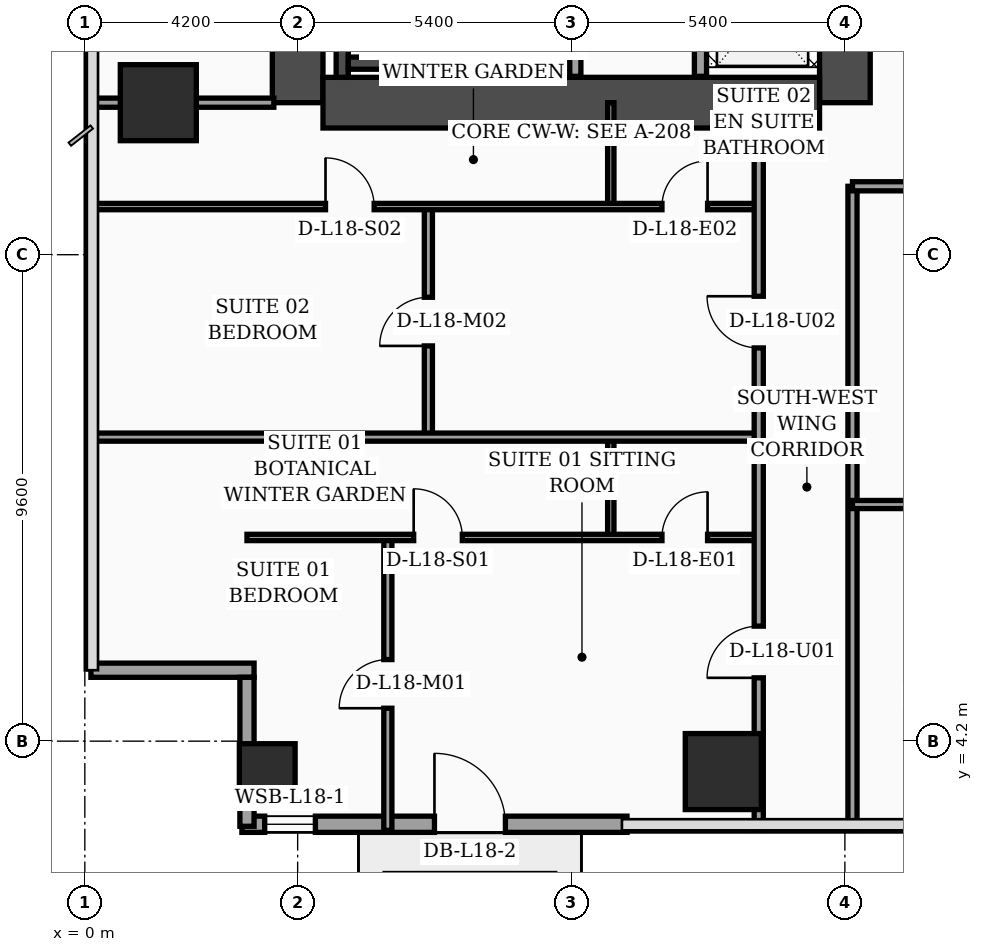
"""IFC4 building model, lengths in metres.
Left out: names, types, materials, properties, quantities, classifications, styles, units other than length and angle.
Written with IfcOpenShell. Run it as: python <this file> out.ifc"""

import sys

from ifc_helpers import new_model, si_unit, direction, frame, frame_2d, origin, origin_2d, place, context, subcontext, project, spatial, rectangle, hollow_rectangle, extrude, element, fill, save


model = new_model("IFC4")
c1 = context("Model", 3, precision=1e-05, world=origin(), true_north=direction((0.0, 1.0)))
c2 = subcontext(c1, "Body", "Model", "MODEL_VIEW")
j1 = project(units=[si_unit("LENGTHUNIT", "METRE"), si_unit("PLANEANGLEUNIT", "RADIAN")], contexts=[c1])
p1 = place(None, origin())
s1 = spatial("IfcSite", under=j1, at=p1, CompositionType="ELEMENT")
p2 = place(p1, origin())
s2 = spatial("IfcBuilding", under=s1, at=p2, CompositionType="ELEMENT")
p3 = place(p2, frame((0.0, 0.0, 77.4)))
s3 = spatial("IfcBuildingStorey", under=s2, at=p3, CompositionType="ELEMENT", Elevation=77.4)
p4 = place(p3, frame((4.2, 16.8, 0.0), z_axis=(0.0, 0.0, 1.0), x_axis=(0.0, 1.0, 0.0)))
e1 = element("IfcWall", 1, at=p4, inside=s3, PredefinedType="SHEAR", context=c2, shape_type="SweptSolid", body=[
    extrude(rectangle(XDim=21.6, YDim=1.0, at=frame_2d((10.8, 0.0))), origin(), (0.0, 0.0, 1.0), 3.56),
])
p5 = place(p3, frame((15.0, 16.8, 0.0), z_axis=(0.0, 0.0, 1.0), x_axis=(0.0, 1.0, 0.0)))
e2 = element("IfcWall", 2, at=p5, inside=s3, PredefinedType="SHEAR", context=c2, shape_type="SweptSolid", body=[
    extrude(rectangle(XDim=21.6, YDim=1.0, at=frame_2d((10.8, 0.0))), origin(), (0.0, 0.0, 1.0), 3.56),
])
p6 = place(p5, frame((8.65, 0.0, 0.0)))
e3 = element("IfcOpeningElement", 3, at=p6, cuts=e2, PredefinedType="OPENING", context=c2, shape_type="SweptSolid", body=[
    extrude(rectangle(XDim=1.1, YDim=2.2, at=frame_2d((0.55, 1.1))), frame((0.0, 0.51, 0.0), z_axis=(0.0, -1.0, 0.0), x_axis=(1.0, 0.0, 0.0)), (0.0, 0.0, 1.0), 1.02),
])
p7 = place(p5, frame((1.25, 0.0, 0.0)))
e4 = element("IfcOpeningElement", 4, at=p7, cuts=e2, PredefinedType="OPENING", context=c2, shape_type="SweptSolid", body=[
    extrude(rectangle(XDim=1.1, YDim=2.2, at=frame_2d((0.55, 1.1))), frame((0.0, 0.51, 0.0), z_axis=(0.0, -1.0, 0.0), x_axis=(1.0, 0.0, 0.0)), (0.0, 0.0, 1.0), 1.02),
])
p8 = place(p5, frame((3.8, 0.0, 0.0)))
e5 = element("IfcOpeningElement", 5, at=p8, cuts=e2, PredefinedType="OPENING", context=c2, shape_type="SweptSolid", body=[
    extrude(rectangle(XDim=1.1, YDim=2.2, at=frame_2d((0.55, 1.1))), frame((0.0, 0.51, 0.0), z_axis=(0.0, -1.0, 0.0), x_axis=(1.0, 0.0, 0.0)), (0.0, 0.0, 1.0), 1.02),
])
p9 = place(p5, frame((6.35, 0.0, 0.0)))
e6 = element("IfcOpeningElement", 6, at=p9, cuts=e2, PredefinedType="OPENING", context=c2, shape_type="SweptSolid", body=[
    extrude(rectangle(XDim=1.1, YDim=2.2, at=frame_2d((0.55, 1.1))), frame((0.0, 0.51, 0.0), z_axis=(0.0, -1.0, 0.0), x_axis=(1.0, 0.0, 0.0)), (0.0, 0.0, 1.0), 1.02),
])
p10 = place(p3, frame((4.7, 16.8, 0.0), z_axis=(0.0, 0.0, 1.0), x_axis=(1.0, 0.0, 0.0)))
e7 = element("IfcWall", 7, at=p10, inside=s3, PredefinedType="SHEAR", context=c2, shape_type="SweptSolid", body=[
    extrude(rectangle(XDim=9.8, YDim=1.0, at=frame_2d((4.9, 0.0))), origin(), (0.0, 0.0, 1.0), 3.56),
])
p11 = place(p3, frame((5.08, 17.3, 0.0), z_axis=(0.0, 0.0, 1.0), x_axis=(0.0, 1.0, 0.0)))
e8 = element("IfcWall", 8, at=p11, inside=s3, PredefinedType="SOLIDWALL", context=c2, shape_type="SweptSolid", body=[
    extrude(rectangle(XDim=9.49, YDim=0.24, at=frame_2d((4.745, 0.0))), origin(), (0.0, 0.0, 1.0), 3.56),
])
p12 = place(p3, frame((8.42, 17.3, 0.0), z_axis=(0.0, 0.0, 1.0), x_axis=(0.0, 1.0, 0.0)))
e9 = element("IfcWall", 9, at=p12, inside=s3, PredefinedType="SOLIDWALL", context=c2, shape_type="SweptSolid", body=[
    extrude(rectangle(XDim=9.49, YDim=0.24, at=frame_2d((4.745, 0.0))), origin(), (0.0, 0.0, 1.0), 3.56),
])
p13 = place(p12, frame((0.35, 0.0, 0.0)))
e10 = element("IfcOpeningElement", 10, at=p13, cuts=e9, PredefinedType="OPENING", context=c2, shape_type="SweptSolid", body=[
    extrude(rectangle(XDim=1.15, YDim=2.2, at=frame_2d((0.575, 1.1))), frame((0.0, 0.13, 0.0), z_axis=(0.0, -1.0, 0.0), x_axis=(1.0, 0.0, 0.0)), (0.0, 0.0, 1.0), 0.26),
])
p14 = place(p3, frame((5.2, 17.58, 0.0), z_axis=(0.0, 0.0, 1.0), x_axis=(1.0, 0.0, 0.0)))
e11 = element("IfcWall", 11, at=p14, inside=s3, PredefinedType="SOLIDWALL", context=c2, shape_type="SweptSolid", body=[
    extrude(rectangle(XDim=3.1, YDim=0.24, at=frame_2d((1.55, 0.0))), origin(), (0.0, 0.0, 1.0), 3.56),
])
p15 = place(p3, frame((3.6, 3.6, 0.0), z_axis=(0.0, 0.0, 1.0), x_axis=(1.0, 0.0, 0.0)))
e12 = element("IfcColumn", 12, at=p15, inside=s3, PredefinedType="COLUMN", context=c2, shape_type="SweptSolid", body=[
    extrude(hollow_rectangle(XDim=1.1, YDim=1.1, WallThickness=0.045, at=origin_2d()), origin(), (0.0, 0.0, 1.0), 3.56),
])
for number, where, z_axis, x_axis in (
    (13, (1.45, 16.8, 0.0), (0.0, 0.0, 1.0), (1.0, 0.0, 0.0)),
    (14, (12.6, 3.6, 0.0), (0.0, 0.0, 1.0), (1.0, 0.0, 0.0)),
):
    element("IfcColumn", number, at=place(p3, frame(where, z_axis=z_axis, x_axis=x_axis)), inside=s3, PredefinedType="COLUMN", context=c2, shape_type="SweptSolid", body=[
        extrude(rectangle(XDim=1.5, YDim=1.5, at=origin_2d()), origin(), (0.0, 0.0, 1.0), 3.56),
    ])
p16 = place(p3, frame((3.1, 2.56, 0.0), z_axis=(0.0, 0.0, 1.0), x_axis=(1.0, 0.0, 0.0)))
e15 = element("IfcWall", 15, at=p16, inside=s3, PredefinedType="SOLIDWALL", context=c2, shape_type="SweptSolid", body=[
    extrude(rectangle(XDim=7.6, YDim=0.32, at=frame_2d((3.8, 0.0))), origin(), (0.0, 0.0, 1.0), 3.56),
])
p17 = place(p16, frame((0.45, 0.0, 0.75)))
e16 = element("IfcOpeningElement", 16, at=p17, cuts=e15, PredefinedType="OPENING", context=c2, shape_type="SweptSolid", body=[
    extrude(rectangle(XDim=1.0, YDim=1.6, at=frame_2d((0.5, 0.8))), frame((0.0, 0.17, 0.0), z_axis=(0.0, -1.0, 0.0), x_axis=(1.0, 0.0, 0.0)), (0.0, 0.0, 1.0), 0.34),
])
p18 = place(p16, frame((3.8, 0.0, 0.0)))
e17 = element("IfcOpeningElement", 17, at=p18, cuts=e15, PredefinedType="OPENING", context=c2, shape_type="SweptSolid", body=[
    extrude(rectangle(XDim=1.4, YDim=2.25, at=frame_2d((0.7, 1.125))), frame((0.0, 0.17, 0.0), z_axis=(0.0, -1.0, 0.0), x_axis=(1.0, 0.0, 0.0)), (0.0, 0.0, 1.0), 0.34),
])
p19 = place(p3, frame((0.12, 5.6, 0.0), z_axis=(0.0, 0.0, 1.0), x_axis=(1.0, 0.0, 0.0)))
e18 = element("IfcWall", 18, at=p19, inside=s3, PredefinedType="SOLIDWALL", context=c2, shape_type="SweptSolid", body=[
    extrude(rectangle(XDim=3.22, YDim=0.28, at=frame_2d((1.61, 0.0))), origin(), (0.0, 0.0, 1.0), 2.84),
])
p20 = place(p3, frame((3.2, 5.46, 0.0), z_axis=(0.0, 0.0, 1.0), x_axis=(0.0, -1.0, 0.0)))
e19 = element("IfcWall", 19, at=p20, inside=s3, PredefinedType="SOLIDWALL", context=c2, shape_type="SweptSolid", body=[
    extrude(rectangle(XDim=2.94, YDim=0.28, at=frame_2d((1.47, 0.0))), origin(), (0.0, 0.0, 1.0), 2.84),
])
p21 = place(p3, frame((9.68, 17.32, 0.0), z_axis=(0.0, 0.0, 1.0), x_axis=(0.0, 1.0, 0.0)))
e20 = element("IfcWall", 20, at=p21, inside=s3, PredefinedType="SOLIDWALL", context=c2, shape_type="SweptSolid", body=[
    extrude(rectangle(XDim=7.68, YDim=0.22, at=frame_2d((3.84, 0.0))), origin(), (0.0, 0.0, 1.0), 3.56),
])
p22 = place(p3, frame((12.15, 17.32, 0.0), z_axis=(0.0, 0.0, 1.0), x_axis=(0.0, 1.0, 0.0)))
e21 = element("IfcWall", 21, at=p22, inside=s3, PredefinedType="SOLIDWALL", context=c2, shape_type="SweptSolid", body=[
    extrude(rectangle(XDim=7.65, YDim=0.24, at=frame_2d((3.825, 0.0))), origin(), (0.0, 0.0, 1.0), 3.56),
])
p23 = place(p3, frame((0.08, 16.8, 0.0), z_axis=(0.0, 0.0, 1.0), x_axis=(1.0, 0.0, 0.0)))
e22 = element("IfcWall", 22, at=p23, inside=s3, PredefinedType="PARTITIONING", context=c2, shape_type="SweptSolid", body=[
    extrude(rectangle(XDim=3.65, YDim=0.18, at=frame_2d((1.825, 0.0))), origin(), (0.0, 0.0, 1.0), 2.84),
])
p24 = place(p3, frame((10.38, 8.22, 0.0), z_axis=(0.0, 0.0, 1.0), x_axis=(0.0, 1.0, 0.0)))
e23 = element("IfcWall", 23, at=p24, inside=s3, PredefinedType="PARTITIONING", context=c2, shape_type="SweptSolid", body=[
    extrude(rectangle(XDim=1.98, YDim=0.125, at=frame_2d((0.99, 0.0))), origin(), (0.0, 0.0, 1.0), 3.09),
])
p25 = place(p3, frame((5.98, 2.44, 0.0), z_axis=(0.0, 0.0, 1.0), x_axis=(0.0, 1.0, 0.0)))
e24 = element("IfcWall", 24, at=p25, inside=s3, PredefinedType="PARTITIONING", context=c2, shape_type="SweptSolid", body=[
    extrude(rectangle(XDim=5.78, YDim=0.16, at=frame_2d((2.89, 0.0))), origin(), (0.0, 0.0, 1.0), 3.04),
])
p26 = place(p25, frame((2.41, 0.0, 0.0)))
e25 = element("IfcOpeningElement", 25, at=p26, cuts=e24, PredefinedType="OPENING", context=c2, shape_type="SweptSolid", body=[
    extrude(rectangle(XDim=0.96, YDim=2.2, at=frame_2d((0.48, 1.1))), frame((0.0, 0.09, 0.0), z_axis=(0.0, -1.0, 0.0), x_axis=(1.0, 0.0, 0.0)), (0.0, 0.0, 1.0), 0.18),
])
p27 = place(p3, frame((3.2, 8.22, 0.0), z_axis=(0.0, 0.0, 1.0), x_axis=(1.0, 0.0, 0.0)))
e26 = element("IfcWall", 26, at=p27, inside=s3, PredefinedType="PARTITIONING", context=c2, shape_type="SweptSolid", body=[
    extrude(rectangle(XDim=10.1, YDim=0.125, at=frame_2d((5.05, 0.0))), origin(), (0.0, 0.0, 1.0), 2.84),
])
p28 = place(p27, frame((3.29, 0.0, 0.0)))
e27 = element("IfcOpeningElement", 27, at=p28, cuts=e26, PredefinedType="OPENING", context=c2, shape_type="SweptSolid", body=[
    extrude(rectangle(XDim=0.96, YDim=2.2, at=frame_2d((0.48, 1.1))), frame((0.0, 0.073, 0.0), z_axis=(0.0, -1.0, 0.0), x_axis=(1.0, 0.0, 0.0)), (0.0, 0.0, 1.0), 0.145),
])
p29 = place(p27, frame((8.19, 0.0, 0.0)))
e28 = element("IfcOpeningElement", 28, at=p29, cuts=e26, PredefinedType="OPENING", context=c2, shape_type="SweptSolid", body=[
    extrude(rectangle(XDim=0.9, YDim=2.15, at=frame_2d((0.45, 1.075))), frame((0.0, 0.073, 0.0), z_axis=(0.0, -1.0, 0.0), x_axis=(1.0, 0.0, 0.0)), (0.0, 0.0, 1.0), 0.145),
])
p30 = place(p3, frame((10.38, 14.75, 0.0), z_axis=(0.0, 0.0, 1.0), x_axis=(0.0, 1.0, 0.0)))
e29 = element("IfcWall", 29, at=p30, inside=s3, PredefinedType="PARTITIONING", context=c2, shape_type="SweptSolid", body=[
    extrude(rectangle(XDim=2.05, YDim=0.125, at=frame_2d((1.025, 0.0))), origin(), (0.0, 0.0, 1.0), 3.56),
])
p31 = place(p3, frame((6.78, 10.2, 0.0), z_axis=(0.0, 0.0, 1.0), x_axis=(0.0, 1.0, 0.0)))
e30 = element("IfcWall", 30, at=p31, inside=s3, PredefinedType="PARTITIONING", context=c2, shape_type="SweptSolid", body=[
    extrude(rectangle(XDim=4.55, YDim=0.16, at=frame_2d((2.275, 0.0))), origin(), (0.0, 0.0, 1.0), 3.14),
])
p32 = place(p31, frame((1.8, 0.0, 0.0)))
e31 = element("IfcOpeningElement", 31, at=p32, cuts=e30, PredefinedType="OPENING", context=c2, shape_type="SweptSolid", body=[
    extrude(rectangle(XDim=0.96, YDim=2.2, at=frame_2d((0.48, 1.1))), frame((0.0, 0.09, 0.0), z_axis=(0.0, -1.0, 0.0), x_axis=(1.0, 0.0, 0.0)), (0.0, 0.0, 1.0), 0.18),
])
p33 = place(p3, frame((0.08, 14.75, 0.0), z_axis=(0.0, 0.0, 1.0), x_axis=(1.0, 0.0, 0.0)))
e32 = element("IfcWall", 32, at=p33, inside=s3, PredefinedType="PARTITIONING", context=c2, shape_type="SweptSolid", body=[
    extrude(rectangle(XDim=13.22, YDim=0.125, at=frame_2d((6.61, 0.0))), origin(), (0.0, 0.0, 1.0), 2.84),
])
p34 = place(p33, frame((4.67, 0.0, 0.0)))
e33 = element("IfcOpeningElement", 33, at=p34, cuts=e32, PredefinedType="OPENING", context=c2, shape_type="SweptSolid", body=[
    extrude(rectangle(XDim=0.96, YDim=2.2, at=frame_2d((0.48, 1.1))), frame((0.0, 0.073, 0.0), z_axis=(0.0, -1.0, 0.0), x_axis=(1.0, 0.0, 0.0)), (0.0, 0.0, 1.0), 0.145),
])
p35 = place(p33, frame((11.31, 0.0, 0.0)))
e34 = element("IfcOpeningElement", 34, at=p35, cuts=e32, PredefinedType="OPENING", context=c2, shape_type="SweptSolid", body=[
    extrude(rectangle(XDim=0.9, YDim=2.15, at=frame_2d((0.45, 1.075))), frame((0.0, 0.073, 0.0), z_axis=(0.0, -1.0, 0.0), x_axis=(1.0, 0.0, 0.0)), (0.0, 0.0, 1.0), 0.145),
])
p36 = place(p3, frame((0.08, 10.2, 0.0), z_axis=(0.0, 0.0, 1.0), x_axis=(1.0, 0.0, 0.0)))
e35 = element("IfcWall", 35, at=p36, inside=s3, PredefinedType="PARTITIONING", context=c2, shape_type="SweptSolid", body=[
    extrude(rectangle(XDim=13.22, YDim=0.16, at=frame_2d((6.61, 0.0))), origin(), (0.0, 0.0, 1.0), 2.84),
])
p37 = place(p3, frame((13.3, 2.44, 0.0), z_axis=(0.0, 0.0, 1.0), x_axis=(0.0, 1.0, 0.0)))
e36 = element("IfcWall", 36, at=p37, inside=s3, PredefinedType="PARTITIONING", context=c2, shape_type="SweptSolid", body=[
    extrude(rectangle(XDim=14.36, YDim=0.18, at=frame_2d((7.18, 0.0))), origin(), (0.0, 0.0, 1.0), 3.04),
])
p38 = place(p37, frame((3.01, 0.0, 0.0)))
e37 = element("IfcOpeningElement", 37, at=p38, cuts=e36, PredefinedType="OPENING", context=c2, shape_type="SweptSolid", body=[
    extrude(rectangle(XDim=1.02, YDim=2.2, at=frame_2d((0.51, 1.1))), frame((0.0, 0.1, 0.0), z_axis=(0.0, -1.0, 0.0), x_axis=(1.0, 0.0, 0.0)), (0.0, 0.0, 1.0), 0.2),
])
p39 = place(p37, frame((9.52, 0.0, 0.0)))
e38 = element("IfcOpeningElement", 38, at=p39, cuts=e36, PredefinedType="OPENING", context=c2, shape_type="SweptSolid", body=[
    extrude(rectangle(XDim=1.02, YDim=2.2, at=frame_2d((0.51, 1.1))), frame((0.0, 0.1, 0.0), z_axis=(0.0, -1.0, 0.0), x_axis=(1.0, 0.0, 0.0)), (0.0, 0.0, 1.0), 0.2),
])
p40 = place(p3, frame((15.15, 2.44, 0.0), z_axis=(0.0, 0.0, 1.0), x_axis=(0.0, 1.0, 0.0)))
e39 = element("IfcWall", 39, at=p40, inside=s3, PredefinedType="PARTITIONING", context=c2, shape_type="SweptSolid", body=[
    extrude(rectangle(XDim=12.71, YDim=0.18, at=frame_2d((6.355, 0.0))), origin(), (0.0, 0.0, 1.0), 3.04),
])
p41 = place(p3, frame((15.15, 8.87, 0.0), z_axis=(0.0, 0.0, 1.0), x_axis=(1.0, 0.0, 0.0)))
e40 = element("IfcWall", 40, at=p41, inside=s3, PredefinedType="PARTITIONING", context=c2, shape_type="SweptSolid", body=[
    extrude(rectangle(XDim=4.45, YDim=0.16, at=frame_2d((2.225, 0.0))), origin(), (0.0, 0.0, 1.0), 3.56),
])
p42 = place(p41, frame((1.75, 0.0, 0.0)))
e41 = element("IfcOpeningElement", 41, at=p42, cuts=e40, PredefinedType="OPENING", context=c2, shape_type="SweptSolid", body=[
    extrude(rectangle(XDim=0.96, YDim=2.2, at=frame_2d((0.48, 1.1))), frame((0.0, 0.09, 0.0), z_axis=(0.0, -1.0, 0.0), x_axis=(1.0, 0.0, 0.0)), (0.0, 0.0, 1.0), 0.18),
])
p43 = place(p3, frame((15.15, 15.15, 0.0), z_axis=(0.0, 0.0, 1.0), x_axis=(1.0, 0.0, 0.0)))
e42 = element("IfcWall", 42, at=p43, inside=s3, PredefinedType="PARTITIONING", context=c2, shape_type="SweptSolid", body=[
    extrude(rectangle(XDim=6.45, YDim=0.18, at=frame_2d((3.225, 0.0))), origin(), (0.0, 0.0, 1.0), 2.34),
])
p44 = place(p43, frame((1.74, 0.0, 0.0)))
e43 = element("IfcOpeningElement", 43, at=p44, cuts=e42, PredefinedType="OPENING", context=c2, shape_type="SweptSolid", body=[
    extrude(rectangle(XDim=1.02, YDim=2.2, at=frame_2d((0.51, 1.1))), frame((0.0, 0.1, 0.0), z_axis=(0.0, -1.0, 0.0), x_axis=(1.0, 0.0, 0.0)), (0.0, 0.0, 1.0), 0.2),
])
p45 = place(p17, origin())
e44 = element("IfcWindow", 44, at=p45, inside=s3, PartitioningType="SINGLE_PANEL", PredefinedType="WINDOW", context=c2, shape_type="SweptSolid", body=[
    extrude(rectangle(XDim=1.0, YDim=1.6, at=frame_2d((0.5, 0.8))), frame((0.0, 0.03, 0.0), z_axis=(0.0, -1.0, 0.0), x_axis=(1.0, 0.0, 0.0)), (0.0, 0.0, 1.0), 0.06),
])
fill(e16, e44)
p46 = place(p18, origin())
e45 = element("IfcDoor", 45, at=p46, inside=s3, OperationType="SINGLE_SWING_LEFT", PredefinedType="DOOR", context=c2, shape_type="SweptSolid", body=[
    extrude(rectangle(XDim=1.4, YDim=2.25, at=frame_2d((0.7, 1.125))), frame((0.0, 0.025, 0.0), z_axis=(0.0, -1.0, 0.0), x_axis=(1.0, 0.0, 0.0)), (0.0, 0.0, 1.0), 0.05),
])
fill(e17, e45)
p47 = place(p26, origin())
e46 = element("IfcDoor", 46, at=p47, inside=s3, OperationType="SINGLE_SWING_LEFT", PredefinedType="DOOR", context=c2, shape_type="SweptSolid", body=[
    extrude(rectangle(XDim=0.96, YDim=2.2, at=frame_2d((0.48, 1.1))), frame((0.0, 0.025, 0.0), z_axis=(0.0, -1.0, 0.0), x_axis=(1.0, 0.0, 0.0)), (0.0, 0.0, 1.0), 0.05),
])
fill(e25, e46)
p48 = place(p28, origin())
e47 = element("IfcDoor", 47, at=p48, inside=s3, OperationType="SINGLE_SWING_LEFT", PredefinedType="DOOR", context=c2, shape_type="SweptSolid", body=[
    extrude(rectangle(XDim=0.96, YDim=2.2, at=frame_2d((0.48, 1.1))), frame((0.0, 0.025, 0.0), z_axis=(0.0, -1.0, 0.0), x_axis=(1.0, 0.0, 0.0)), (0.0, 0.0, 1.0), 0.05),
])
fill(e27, e47)
p49 = place(p29, origin())
e48 = element("IfcDoor", 48, at=p49, inside=s3, OperationType="SINGLE_SWING_RIGHT", PredefinedType="DOOR", context=c2, shape_type="SweptSolid", body=[
    extrude(rectangle(XDim=0.9, YDim=2.15, at=frame_2d((0.45, 1.075))), frame((0.0, 0.025, 0.0), z_axis=(0.0, -1.0, 0.0), x_axis=(1.0, 0.0, 0.0)), (0.0, 0.0, 1.0), 0.05),
])
fill(e28, e48)
p50 = place(p32, origin())
e49 = element("IfcDoor", 49, at=p50, inside=s3, OperationType="SINGLE_SWING_LEFT", PredefinedType="DOOR", context=c2, shape_type="SweptSolid", body=[
    extrude(rectangle(XDim=0.96, YDim=2.2, at=frame_2d((0.48, 1.1))), frame((0.0, 0.025, 0.0), z_axis=(0.0, -1.0, 0.0), x_axis=(1.0, 0.0, 0.0)), (0.0, 0.0, 1.0), 0.05),
])
fill(e31, e49)
p51 = place(p34, origin())
e50 = element("IfcDoor", 50, at=p51, inside=s3, OperationType="SINGLE_SWING_LEFT", PredefinedType="DOOR", context=c2, shape_type="SweptSolid", body=[
    extrude(rectangle(XDim=0.96, YDim=2.2, at=frame_2d((0.48, 1.1))), frame((0.0, 0.025, 0.0), z_axis=(0.0, -1.0, 0.0), x_axis=(1.0, 0.0, 0.0)), (0.0, 0.0, 1.0), 0.05),
])
fill(e33, e50)
p52 = place(p35, origin())
e51 = element("IfcDoor", 51, at=p52, inside=s3, OperationType="SINGLE_SWING_RIGHT", PredefinedType="DOOR", context=c2, shape_type="SweptSolid", body=[
    extrude(rectangle(XDim=0.9, YDim=2.15, at=frame_2d((0.45, 1.075))), frame((0.0, 0.025, 0.0), z_axis=(0.0, -1.0, 0.0), x_axis=(1.0, 0.0, 0.0)), (0.0, 0.0, 1.0), 0.05),
])
fill(e34, e51)
p53 = place(p38, origin())
e52 = element("IfcDoor", 52, at=p53, inside=s3, OperationType="SINGLE_SWING_LEFT", PredefinedType="DOOR", context=c2, shape_type="SweptSolid", body=[
    extrude(rectangle(XDim=1.02, YDim=2.2, at=frame_2d((0.51, 1.1))), frame((0.0, 0.025, 0.0), z_axis=(0.0, -1.0, 0.0), x_axis=(1.0, 0.0, 0.0)), (0.0, 0.0, 1.0), 0.05),
])
fill(e37, e52)
p54 = place(p39, origin())
e53 = element("IfcDoor", 53, at=p54, inside=s3, OperationType="SINGLE_SWING_RIGHT", PredefinedType="DOOR", context=c2, shape_type="SweptSolid", body=[
    extrude(rectangle(XDim=1.02, YDim=2.2, at=frame_2d((0.51, 1.1))), frame((0.0, 0.025, 0.0), z_axis=(0.0, -1.0, 0.0), x_axis=(1.0, 0.0, 0.0)), (0.0, 0.0, 1.0), 0.05),
])
fill(e38, e53)
p55 = place(p13, origin())
e54 = element("IfcDoor", 54, at=p55, inside=s3, OperationType="SINGLE_SWING_LEFT", PredefinedType="DOOR", context=c2, shape_type="SweptSolid", body=[
    extrude(rectangle(XDim=1.15, YDim=2.2, at=frame_2d((0.575, 1.1))), frame((0.0, 0.025, 0.0), z_axis=(0.0, -1.0, 0.0), x_axis=(1.0, 0.0, 0.0)), (0.0, 0.0, 1.0), 0.05),
])
fill(e10, e54)
save(model, sys.argv[1])
